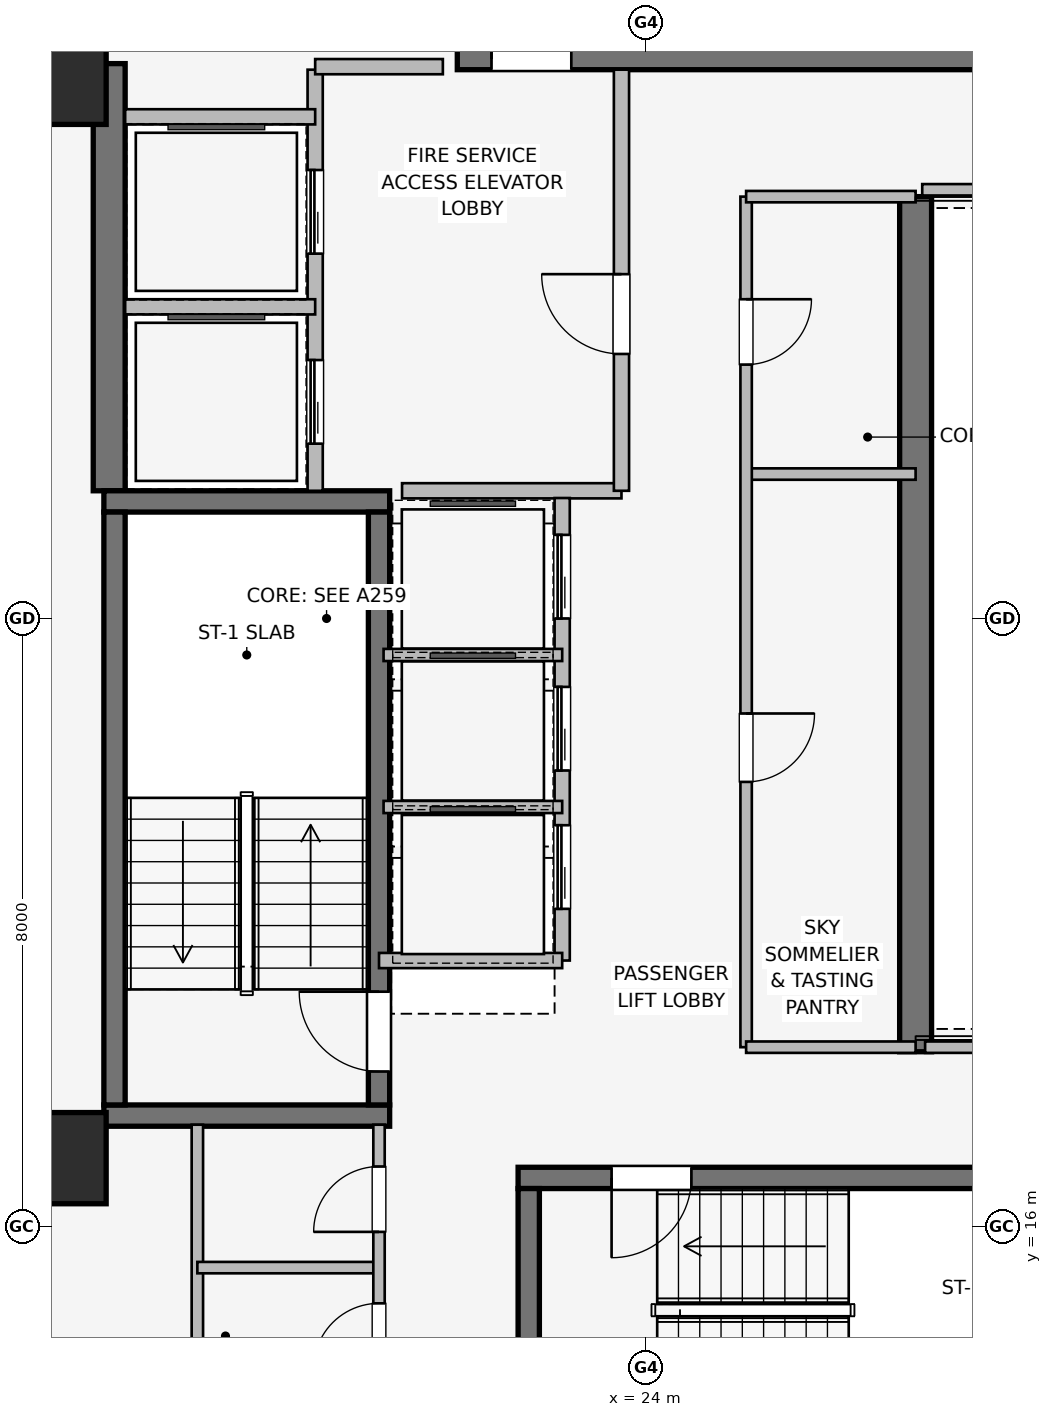
"""IFC4 building model, lengths in metres.
Left out: names, types, materials, properties, quantities, classifications, styles, units other than length and angle.
Written with IfcOpenShell. Run it as: python <this file> out.ifc"""

import sys

from ifc_helpers import new_model, si_unit, direction, frame, frame_2d, origin, origin_2d, place, context, subcontext, project, spatial, rectangle, extrude, element, fill, save


model = new_model("IFC4")
c1 = context("Model", 3, precision=1e-05, world=origin(), true_north=direction((0.0, 1.0)))
c2 = subcontext(c1, "Body", "Model", "MODEL_VIEW")
j1 = project(units=[si_unit("LENGTHUNIT", "METRE"), si_unit("PLANEANGLEUNIT", "RADIAN")], contexts=[c1])
p1 = place(None, origin())
s1 = spatial("IfcSite", under=j1, at=p1, CompositionType="ELEMENT")
p2 = place(p1, origin())
s2 = spatial("IfcBuilding", under=s1, at=p2, CompositionType="ELEMENT")
p3 = place(p2, frame((0.0, 0.0, 210.25)))
s3 = spatial("IfcBuildingStorey", under=s2, at=p3, CompositionType="ELEMENT", Elevation=210.25)
p4 = place(p3, frame((16.94, 25.68, 0.0), z_axis=(0.0, 0.0, 1.0), x_axis=(0.0, 1.0, 0.0)))
e1 = element("IfcWall", 1, at=p4, inside=s3, PredefinedType="SHEAR", context=c2, shape_type="SweptSolid", body=[
    extrude(rectangle(XDim=5.62, YDim=0.42, at=frame_2d((2.81, 0.0))), origin(), (0.0, 0.0, 1.0), 3.45),
])
p5 = place(p3, frame((27.55, 29.55, 0.0), z_axis=(0.0, 0.0, 1.0), x_axis=(0.0, -1.0, 0.0)))
e2 = element("IfcWall", 2, at=p5, inside=s3, PredefinedType="SHEAR", context=c2, shape_type="SweptSolid", body=[
    extrude(rectangle(XDim=11.25, YDim=0.42, at=frame_2d((5.625, 0.0))), origin(), (0.0, 0.0, 1.0), 3.45),
])
for number, where, z_axis, x_axis in (
    (3, (16.87, 17.46, 0.0), (0.0, 0.0, 1.0), (1.0, 0.0, 0.0)),
    (4, (20.63, 25.54, 0.0), (0.0, 0.0, 1.0), (-1.0, 0.0, 0.0)),
):
    element("IfcWall", number, at=place(p3, frame(where, z_axis=z_axis, x_axis=x_axis)), inside=s3, PredefinedType="SHEAR", context=c2, shape_type="SweptSolid", body=[
        extrude(rectangle(XDim=3.76, YDim=0.28, at=frame_2d((1.88, 0.0))), origin(), (0.0, 0.0, 1.0), 3.45),
    ])
p6 = place(p3, frame((17.01, 25.4, 0.0), z_axis=(0.0, 0.0, 1.0), x_axis=(0.0, -1.0, 0.0)))
e5 = element("IfcWall", 5, at=p6, inside=s3, PredefinedType="SHEAR", context=c2, shape_type="SweptSolid", body=[
    extrude(rectangle(XDim=7.8, YDim=0.28, at=frame_2d((3.9, 0.0))), origin(), (0.0, 0.0, 1.0), 3.45),
])
p7 = place(p3, frame((20.49, 17.6, 0.0), z_axis=(0.0, 0.0, 1.0), x_axis=(0.0, 1.0, 0.0)))
e6 = element("IfcWall", 6, at=p7, inside=s3, PredefinedType="SHEAR", context=c2, shape_type="SweptSolid", body=[
    extrude(rectangle(XDim=7.8, YDim=0.28, at=frame_2d((3.9, 0.0))), origin(), (0.0, 0.0, 1.0), 3.45),
])
p8 = place(p7, frame((0.44, 0.0, 0.0)))
e7 = element("IfcOpeningElement", 7, at=p8, cuts=e6, PredefinedType="OPENING", context=c2, shape_type="SweptSolid", body=[
    extrude(rectangle(XDim=1.05, YDim=2.0, at=frame_2d((0.525, 1.0))), frame((0.0, 0.15, 0.0), z_axis=(0.0, -1.0, 0.0), x_axis=(1.0, 0.0, 0.0)), (0.0, 0.0, 1.0), 0.3),
])
p9 = place(p3, frame((30.68, 16.64, 0.0), z_axis=(0.0, 0.0, 1.0), x_axis=(-1.0, 0.0, 0.0)))
e8 = element("IfcWall", 8, at=p9, inside=s3, PredefinedType="SHEAR", context=c2, shape_type="SweptSolid", body=[
    extrude(rectangle(XDim=8.36, YDim=0.28, at=frame_2d((4.18, 0.0))), origin(), (0.0, 0.0, 1.0), 3.45),
])
p10 = place(p9, frame((6.08, 0.0, 0.0)))
e9 = element("IfcOpeningElement", 9, at=p10, cuts=e8, PredefinedType="OPENING", context=c2, shape_type="SweptSolid", body=[
    extrude(rectangle(XDim=1.05, YDim=2.0, at=frame_2d((0.525, 1.0))), frame((0.0, 0.15, 0.0), z_axis=(0.0, -1.0, 0.0), x_axis=(1.0, 0.0, 0.0)), (0.0, 0.0, 1.0), 0.3),
])
p11 = place(p3, frame((22.46, 16.5, 0.0), z_axis=(0.0, 0.0, 1.0), x_axis=(0.0, -1.0, 0.0)))
e10 = element("IfcWall", 10, at=p11, inside=s3, PredefinedType="SHEAR", context=c2, shape_type="SweptSolid", body=[
    extrude(rectangle(XDim=3.2, YDim=0.28, at=frame_2d((1.6, 0.0))), origin(), (0.0, 0.0, 1.0), 3.45),
])
p12 = place(p3, frame((21.52, 31.36, 0.0), z_axis=(0.0, 0.0, 1.0), x_axis=(1.0, 0.0, 0.0)))
e11 = element("IfcWall", 11, at=p12, inside=s3, PredefinedType="SHEAR", context=c2, shape_type="SweptSolid", body=[
    extrude(rectangle(XDim=8.36, YDim=0.28, at=frame_2d((4.18, 0.0))), origin(), (0.0, 0.0, 1.0), 3.45),
])
p13 = place(p12, frame((0.45, 0.0, 0.0)))
e12 = element("IfcOpeningElement", 12, at=p13, cuts=e11, PredefinedType="OPENING", context=c2, shape_type="SweptSolid", body=[
    extrude(rectangle(XDim=1.05, YDim=2.0, at=frame_2d((0.525, 1.0))), frame((0.0, 0.15, 0.0), z_axis=(0.0, -1.0, 0.0), x_axis=(1.0, 0.0, 0.0)), (0.0, 0.0, 1.0), 0.3),
])
for number, where, z_axis, x_axis in (
    (13, (16.3, 16.9, 0.0), (0.0, 0.0, 1.0), (1.0, 0.0, 0.0)),
    (14, (16.3, 31.1, 0.0), (0.0, 0.0, 1.0), (1.0, 0.0, 0.0)),
):
    element("IfcColumn", number, at=place(p3, frame(where, z_axis=z_axis, x_axis=x_axis)), inside=s3, PredefinedType="COLUMN", context=c2, shape_type="SweptSolid", body=[
        extrude(rectangle(XDim=1.2, YDim=1.2, at=origin_2d()), origin(), (0.0, 0.0, 1.0), 3.45),
    ])
p14 = place(p3, frame((16.288, 13.685, 0.0), z_axis=(0.0, 0.0, 1.0), x_axis=(-0.520325409202, 0.853968072318, 0.0)))
e15 = element("IfcWall", 15, at=p14, inside=s3, PredefinedType="STANDARD", context=c2, shape_type="SweptSolid", body=[
    extrude(rectangle(XDim=1.678, YDim=0.33, at=frame_2d((0.839, 0.0))), origin(), (0.0, 0.0, 1.0), 3.19),
])
p15 = place(p3, frame((19.65, 25.68, 0.0), z_axis=(0.0, 0.0, 1.0), x_axis=(0.0, 1.0, 0.0)))
e16 = element("IfcWall", 16, at=p15, inside=s3, PredefinedType="PARTITIONING", context=c2, shape_type="SweptSolid", body=[
    extrude(rectangle(XDim=5.54, YDim=0.2, at=frame_2d((2.77, 0.0))), origin(), (0.0, 0.0, 1.0), 3.19),
])
p16 = place(p15, frame((0.62, 0.0, 0.0)))
e17 = element("IfcOpeningElement", 17, at=p16, cuts=e16, PredefinedType="OPENING", context=c2, shape_type="SweptSolid", body=[
    extrude(rectangle(XDim=1.1, YDim=2.2, at=frame_2d((0.55, 1.1))), frame((0.0, 0.11, 0.0), z_axis=(0.0, -1.0, 0.0), x_axis=(1.0, 0.0, 0.0)), (0.0, 0.0, 1.0), 0.22),
])
p17 = place(p15, frame((3.12, 0.0, 0.0)))
e18 = element("IfcOpeningElement", 18, at=p17, cuts=e16, PredefinedType="OPENING", context=c2, shape_type="SweptSolid", body=[
    extrude(rectangle(XDim=1.1, YDim=2.2, at=frame_2d((0.55, 1.1))), frame((0.0, 0.11, 0.0), z_axis=(0.0, -1.0, 0.0), x_axis=(1.0, 0.0, 0.0)), (0.0, 0.0, 1.0), 0.22),
])
p18 = place(p3, frame((20.793, 25.68, 0.0), z_axis=(0.0, 0.0, 1.0), x_axis=(1.0, 0.0, 0.0)))
e19 = element("IfcWall", 19, at=p18, inside=s3, PredefinedType="PARTITIONING", context=c2, shape_type="SweptSolid", body=[
    extrude(rectangle(XDim=2.887, YDim=0.2, at=frame_2d((1.443, 0.0))), origin(), (0.0, 0.0, 1.0), 3.19),
])
p19 = place(p3, frame((23.68, 25.68, 0.0), z_axis=(0.0, 0.0, 1.0), x_axis=(0.0, 1.0, 0.0)))
e20 = element("IfcWall", 20, at=p19, inside=s3, PredefinedType="PARTITIONING", context=c2, shape_type="SweptSolid", body=[
    extrude(rectangle(XDim=5.54, YDim=0.2, at=frame_2d((2.77, 0.0))), origin(), (0.0, 0.0, 1.0), 3.19),
])
p20 = place(p19, frame((1.8, 0.0, 0.0)))
e21 = element("IfcOpeningElement", 21, at=p20, cuts=e20, PredefinedType="OPENING", context=c2, shape_type="SweptSolid", body=[
    extrude(rectangle(XDim=1.05, YDim=2.0, at=frame_2d((0.525, 1.0))), frame((0.0, 0.11, 0.0), z_axis=(0.0, -1.0, 0.0), x_axis=(1.0, 0.0, 0.0)), (0.0, 0.0, 1.0), 0.22),
])
p21 = place(p3, frame((21.33, 31.26, 0.0), z_axis=(0.0, 0.0, 1.0), x_axis=(-1.0, 0.0, 0.0)))
e22 = element("IfcWall", 22, at=p21, inside=s3, PredefinedType="PARTITIONING", context=c2, shape_type="SweptSolid", body=[
    extrude(rectangle(XDim=1.68, YDim=0.2, at=frame_2d((0.84, 0.0))), origin(), (0.0, 0.0, 1.0), 3.19),
])
p22 = place(p3, frame((17.15, 28.1, 0.0), z_axis=(0.0, 0.0, 1.0), x_axis=(1.0, 0.0, 0.0)))
e23 = element("IfcWall", 23, at=p22, inside=s3, PredefinedType="PARTITIONING", context=c2, shape_type="SweptSolid", body=[
    extrude(rectangle(XDim=2.5, YDim=0.2, at=frame_2d((1.25, 0.0))), origin(), (0.0, 0.0, 1.0), 3.19),
])
p23 = place(p3, frame((19.65, 30.6, 0.0), z_axis=(0.0, 0.0, 1.0), x_axis=(-1.0, 0.0, 0.0)))
e24 = element("IfcWall", 24, at=p23, inside=s3, PredefinedType="PARTITIONING", context=c2, shape_type="SweptSolid", body=[
    extrude(rectangle(XDim=2.5, YDim=0.2, at=frame_2d((1.25, 0.0))), origin(), (0.0, 0.0, 1.0), 2.09),
])
p24 = place(p3, frame((22.9, 19.5, 0.0), z_axis=(0.0, 0.0, 1.0), x_axis=(0.0, 1.0, 0.0)))
e25 = element("IfcWall", 25, at=p24, inside=s3, PredefinedType="PARTITIONING", context=c2, shape_type="SweptSolid", body=[
    extrude(rectangle(XDim=6.085, YDim=0.2, at=frame_2d((3.042, 0.0))), origin(), (0.0, 0.0, 1.0), 3.19),
])
p25 = place(p24, frame((0.68, 0.0, 0.0)))
e26 = element("IfcOpeningElement", 26, at=p25, cuts=e25, PredefinedType="OPENING", context=c2, shape_type="SweptSolid", body=[
    extrude(rectangle(XDim=1.1, YDim=2.2, at=frame_2d((0.55, 1.1))), frame((0.0, 0.11, 0.0), z_axis=(0.0, -1.0, 0.0), x_axis=(1.0, 0.0, 0.0)), (0.0, 0.0, 1.0), 0.22),
])
p26 = place(p24, frame((2.5, 0.0, 0.0)))
e27 = element("IfcOpeningElement", 27, at=p26, cuts=e25, PredefinedType="OPENING", context=c2, shape_type="SweptSolid", body=[
    extrude(rectangle(XDim=1.1, YDim=2.2, at=frame_2d((0.55, 1.1))), frame((0.0, 0.11, 0.0), z_axis=(0.0, -1.0, 0.0), x_axis=(1.0, 0.0, 0.0)), (0.0, 0.0, 1.0), 0.22),
])
p27 = place(p24, frame((4.5, 0.0, 0.0)))
e28 = element("IfcOpeningElement", 28, at=p27, cuts=e25, PredefinedType="OPENING", context=c2, shape_type="SweptSolid", body=[
    extrude(rectangle(XDim=1.1, YDim=2.2, at=frame_2d((0.55, 1.1))), frame((0.0, 0.11, 0.0), z_axis=(0.0, -1.0, 0.0), x_axis=(1.0, 0.0, 0.0)), (0.0, 0.0, 1.0), 0.22),
])
p28 = place(p3, frame((20.49, 19.5, 0.0), z_axis=(0.0, 0.0, 1.0), x_axis=(1.0, 0.0, 0.0)))
e29 = element("IfcWall", 29, at=p28, inside=s3, PredefinedType="PARTITIONING", context=c2, shape_type="SweptSolid", body=[
    extrude(rectangle(XDim=2.41, YDim=0.2, at=frame_2d((1.205, 0.0))), origin(), (0.0, 0.0, 1.0), 2.09),
])
for number, where, z_axis, x_axis in (
    (30, (20.55, 21.52, 0.0), (0.0, 0.0, 1.0), (1.0, 0.0, 0.0)),
    (31, (20.55, 23.52, 0.0), (0.0, 0.0, 1.0), (1.0, 0.0, 0.0)),
):
    element("IfcWall", number, at=place(p3, frame(where, z_axis=z_axis, x_axis=x_axis)), inside=s3, PredefinedType="PARTITIONING", context=c2, shape_type="SweptSolid", body=[
        extrude(rectangle(XDim=2.35, YDim=0.16, at=frame_2d((1.175, 0.0))), origin(), (0.0, 0.0, 1.0), 3.19),
    ])
p29 = place(p3, frame((25.32, 25.9, 0.0), z_axis=(0.0, 0.0, 1.0), x_axis=(1.0, 0.0, 0.0)))
e32 = element("IfcWall", 32, at=p29, inside=s3, PredefinedType="PARTITIONING", context=c2, shape_type="SweptSolid", body=[
    extrude(rectangle(XDim=2.23, YDim=0.15, at=frame_2d((1.115, 0.0))), origin(), (0.0, 0.0, 1.0), 3.19),
])
p30 = place(p3, frame((25.32, 29.55, 0.0), z_axis=(0.0, 0.0, 1.0), x_axis=(0.0, -1.0, 0.0)))
e33 = element("IfcWall", 33, at=p30, inside=s3, PredefinedType="PARTITIONING", context=c2, shape_type="SweptSolid", body=[
    extrude(rectangle(XDim=11.19, YDim=0.15, at=frame_2d((5.595, 0.0))), origin(), (0.0, 0.0, 1.0), 3.19),
])
p31 = place(p30, frame((1.35, 0.0, 0.0)))
e34 = element("IfcOpeningElement", 34, at=p31, cuts=e33, PredefinedType="OPENING", context=c2, shape_type="SweptSolid", body=[
    extrude(rectangle(XDim=0.86, YDim=2.0, at=frame_2d((0.43, 1.0))), frame((0.0, 0.085, 0.0), z_axis=(0.0, -1.0, 0.0), x_axis=(1.0, 0.0, 0.0)), (0.0, 0.0, 1.0), 0.17),
])
p32 = place(p30, frame((6.8, 0.0, 0.0)))
e35 = element("IfcOpeningElement", 35, at=p32, cuts=e33, PredefinedType="OPENING", context=c2, shape_type="SweptSolid", body=[
    extrude(rectangle(XDim=0.9, YDim=2.0, at=frame_2d((0.45, 1.0))), frame((0.0, 0.085, 0.0), z_axis=(0.0, -1.0, 0.0), x_axis=(1.0, 0.0, 0.0)), (0.0, 0.0, 1.0), 0.17),
])
p33 = place(p3, frame((25.32, 18.36, 0.0), z_axis=(0.0, 0.0, 1.0), x_axis=(1.0, 0.0, 0.0)))
e36 = element("IfcWall", 36, at=p33, inside=s3, PredefinedType="PARTITIONING", context=c2, shape_type="SweptSolid", body=[
    extrude(rectangle(XDim=2.23, YDim=0.15, at=frame_2d((1.115, 0.0))), origin(), (0.0, 0.0, 1.0), 3.19),
])
p34 = place(p3, frame((27.55, 29.55, 0.0), z_axis=(0.0, 0.0, 1.0), x_axis=(-1.0, 0.0, 0.0)))
e37 = element("IfcWall", 37, at=p34, inside=s3, PredefinedType="PARTITIONING", context=c2, shape_type="SweptSolid", body=[
    extrude(rectangle(XDim=2.23, YDim=0.15, at=frame_2d((1.115, 0.0))), origin(), (0.0, 0.0, 1.0), 2.09),
])
p35 = place(p3, frame((18.1, 17.34, 0.0), z_axis=(0.0, 0.0, 1.0), x_axis=(0.0, -1.0, 0.0)))
e38 = element("IfcWall", 38, at=p35, inside=s3, PredefinedType="PARTITIONING", context=c2, shape_type="SweptSolid", body=[
    extrude(rectangle(XDim=3.66, YDim=0.15, at=frame_2d((1.83, 0.0))), origin(), (0.0, 0.0, 1.0), 3.19),
])
p36 = place(p3, frame((18.1, 15.46, 0.0), z_axis=(0.0, 0.0, 1.0), x_axis=(1.0, 0.0, 0.0)))
e39 = element("IfcWall", 39, at=p36, inside=s3, PredefinedType="PARTITIONING", context=c2, shape_type="SweptSolid", body=[
    extrude(rectangle(XDim=2.39, YDim=0.15, at=frame_2d((1.195, 0.0))), origin(), (0.0, 0.0, 1.0), 3.19),
])
p37 = place(p3, frame((20.49, 13.68, 0.0), z_axis=(0.0, 0.0, 1.0), x_axis=(0.0, 1.0, 0.0)))
e40 = element("IfcWall", 40, at=p37, inside=s3, PredefinedType="PARTITIONING", context=c2, shape_type="SweptSolid", body=[
    extrude(rectangle(XDim=3.66, YDim=0.15, at=frame_2d((1.83, 0.0))), origin(), (0.0, 0.0, 1.0), 3.19),
])
p38 = place(p37, frame((0.45, 0.0, 0.0)))
e41 = element("IfcOpeningElement", 41, at=p38, cuts=e40, PredefinedType="OPENING", context=c2, shape_type="SweptSolid", body=[
    extrude(rectangle(XDim=0.86, YDim=2.0, at=frame_2d((0.43, 1.0))), frame((0.0, 0.085, 0.0), z_axis=(0.0, -1.0, 0.0), x_axis=(1.0, 0.0, 0.0)), (0.0, 0.0, 1.0), 0.17),
])
p39 = place(p37, frame((2.25, 0.0, 0.0)))
e42 = element("IfcOpeningElement", 42, at=p39, cuts=e40, PredefinedType="OPENING", context=c2, shape_type="SweptSolid", body=[
    extrude(rectangle(XDim=0.86, YDim=2.0, at=frame_2d((0.43, 1.0))), frame((0.0, 0.085, 0.0), z_axis=(0.0, -1.0, 0.0), x_axis=(1.0, 0.0, 0.0)), (0.0, 0.0, 1.0), 0.17),
])
p40 = place(p3, frame((27.675, 18.36, 0.0), z_axis=(0.0, 0.0, 1.0), x_axis=(1.0, 0.0, 0.0)))
e43 = element("IfcWall", 43, at=p40, inside=s3, PredefinedType="PARTITIONING", context=c2, shape_type="SweptSolid", body=[
    extrude(rectangle(XDim=12.165, YDim=0.15, at=frame_2d((6.083, 0.0))), origin(), (0.0, 0.0, 1.0), 2.331),
])
p41 = place(p3, frame((39.84, 29.64, 0.0), z_axis=(0.0, 0.0, 1.0), x_axis=(-1.0, 0.0, 0.0)))
e44 = element("IfcWall", 44, at=p41, inside=s3, PredefinedType="PARTITIONING", context=c2, shape_type="SweptSolid", body=[
    extrude(rectangle(XDim=12.203, YDim=0.15, at=frame_2d((6.102, 0.0))), origin(), (0.0, 0.0, 1.0), 2.331),
])
p42 = place(p8, origin())
e45 = element("IfcDoor", 45, at=p42, inside=s3, OperationType="SINGLE_SWING_RIGHT", PredefinedType="DOOR", context=c2, shape_type="SweptSolid", body=[
    extrude(rectangle(XDim=1.05, YDim=2.0, at=frame_2d((0.525, 1.0))), frame((0.0, 0.025, 0.0), z_axis=(0.0, -1.0, 0.0), x_axis=(1.0, 0.0, 0.0)), (0.0, 0.0, 1.0), 0.05),
])
fill(e7, e45)
p43 = place(p10, origin())
e46 = element("IfcDoor", 46, at=p43, inside=s3, OperationType="SINGLE_SWING_RIGHT", PredefinedType="DOOR", context=c2, shape_type="SweptSolid", body=[
    extrude(rectangle(XDim=1.05, YDim=2.0, at=frame_2d((0.525, 1.0))), frame((0.0, 0.025, 0.0), z_axis=(0.0, -1.0, 0.0), x_axis=(1.0, 0.0, 0.0)), (0.0, 0.0, 1.0), 0.05),
])
fill(e9, e46)
p44 = place(p13, origin())
e47 = element("IfcDoor", 47, at=p44, inside=s3, OperationType="SINGLE_SWING_LEFT", PredefinedType="DOOR", context=c2, shape_type="SweptSolid", body=[
    extrude(rectangle(XDim=1.05, YDim=2.0, at=frame_2d((0.525, 1.0))), frame((0.0, 0.025, 0.0), z_axis=(0.0, -1.0, 0.0), x_axis=(1.0, 0.0, 0.0)), (0.0, 0.0, 1.0), 0.05),
])
fill(e12, e47)
p45 = place(p16, origin())
e48 = element("IfcDoor", 48, at=p45, inside=s3, OperationType="SLIDING_TO_LEFT", PredefinedType="DOOR", context=c2, shape_type="SweptSolid", body=[
    extrude(rectangle(XDim=1.1, YDim=2.2, at=frame_2d((0.55, 1.1))), frame((0.0, 0.025, 0.0), z_axis=(0.0, -1.0, 0.0), x_axis=(1.0, 0.0, 0.0)), (0.0, 0.0, 1.0), 0.05),
])
fill(e17, e48)
p46 = place(p17, origin())
e49 = element("IfcDoor", 49, at=p46, inside=s3, OperationType="SLIDING_TO_LEFT", PredefinedType="DOOR", context=c2, shape_type="SweptSolid", body=[
    extrude(rectangle(XDim=1.1, YDim=2.2, at=frame_2d((0.55, 1.1))), frame((0.0, 0.025, 0.0), z_axis=(0.0, -1.0, 0.0), x_axis=(1.0, 0.0, 0.0)), (0.0, 0.0, 1.0), 0.05),
])
fill(e18, e49)
p47 = place(p20, origin())
e50 = element("IfcDoor", 50, at=p47, inside=s3, OperationType="SINGLE_SWING_RIGHT", PredefinedType="DOOR", context=c2, shape_type="SweptSolid", body=[
    extrude(rectangle(XDim=1.05, YDim=2.0, at=frame_2d((0.525, 1.0))), frame((0.0, 0.025, 0.0), z_axis=(0.0, -1.0, 0.0), x_axis=(1.0, 0.0, 0.0)), (0.0, 0.0, 1.0), 0.05),
])
fill(e21, e50)
p48 = place(p25, origin())
e51 = element("IfcDoor", 51, at=p48, inside=s3, OperationType="SLIDING_TO_LEFT", PredefinedType="DOOR", context=c2, shape_type="SweptSolid", body=[
    extrude(rectangle(XDim=1.1, YDim=2.2, at=frame_2d((0.55, 1.1))), frame((0.0, 0.025, 0.0), z_axis=(0.0, -1.0, 0.0), x_axis=(1.0, 0.0, 0.0)), (0.0, 0.0, 1.0), 0.05),
])
fill(e26, e51)
p49 = place(p26, origin())
e52 = element("IfcDoor", 52, at=p49, inside=s3, OperationType="SLIDING_TO_LEFT", PredefinedType="DOOR", context=c2, shape_type="SweptSolid", body=[
    extrude(rectangle(XDim=1.1, YDim=2.2, at=frame_2d((0.55, 1.1))), frame((0.0, 0.025, 0.0), z_axis=(0.0, -1.0, 0.0), x_axis=(1.0, 0.0, 0.0)), (0.0, 0.0, 1.0), 0.05),
])
fill(e27, e52)
p50 = place(p27, origin())
e53 = element("IfcDoor", 53, at=p50, inside=s3, OperationType="SLIDING_TO_LEFT", PredefinedType="DOOR", context=c2, shape_type="SweptSolid", body=[
    extrude(rectangle(XDim=1.1, YDim=2.2, at=frame_2d((0.55, 1.1))), frame((0.0, 0.025, 0.0), z_axis=(0.0, -1.0, 0.0), x_axis=(1.0, 0.0, 0.0)), (0.0, 0.0, 1.0), 0.05),
])
fill(e28, e53)
p51 = place(p31, origin())
e54 = element("IfcDoor", 54, at=p51, inside=s3, OperationType="SINGLE_SWING_LEFT", PredefinedType="DOOR", context=c2, shape_type="SweptSolid", body=[
    extrude(rectangle(XDim=0.86, YDim=2.0, at=frame_2d((0.43, 1.0))), frame((0.0, 0.025, 0.0), z_axis=(0.0, -1.0, 0.0), x_axis=(1.0, 0.0, 0.0)), (0.0, 0.0, 1.0), 0.05),
])
fill(e34, e54)
p52 = place(p32, origin())
e55 = element("IfcDoor", 55, at=p52, inside=s3, OperationType="SINGLE_SWING_LEFT", PredefinedType="DOOR", context=c2, shape_type="SweptSolid", body=[
    extrude(rectangle(XDim=0.9, YDim=2.0, at=frame_2d((0.45, 1.0))), frame((0.0, 0.025, 0.0), z_axis=(0.0, -1.0, 0.0), x_axis=(1.0, 0.0, 0.0)), (0.0, 0.0, 1.0), 0.05),
])
fill(e35, e55)
p53 = place(p38, origin())
e56 = element("IfcDoor", 56, at=p53, inside=s3, OperationType="SINGLE_SWING_LEFT", PredefinedType="DOOR", context=c2, shape_type="SweptSolid", body=[
    extrude(rectangle(XDim=0.86, YDim=2.0, at=frame_2d((0.43, 1.0))), frame((0.0, 0.025, 0.0), z_axis=(0.0, -1.0, 0.0), x_axis=(1.0, 0.0, 0.0)), (0.0, 0.0, 1.0), 0.05),
])
fill(e41, e56)
p54 = place(p39, origin())
e57 = element("IfcDoor", 57, at=p54, inside=s3, OperationType="SINGLE_SWING_LEFT", PredefinedType="DOOR", context=c2, shape_type="SweptSolid", body=[
    extrude(rectangle(XDim=0.86, YDim=2.0, at=frame_2d((0.43, 1.0))), frame((0.0, 0.025, 0.0), z_axis=(0.0, -1.0, 0.0), x_axis=(1.0, 0.0, 0.0)), (0.0, 0.0, 1.0), 0.05),
])
fill(e42, e57)
save(model, sys.argv[1])
